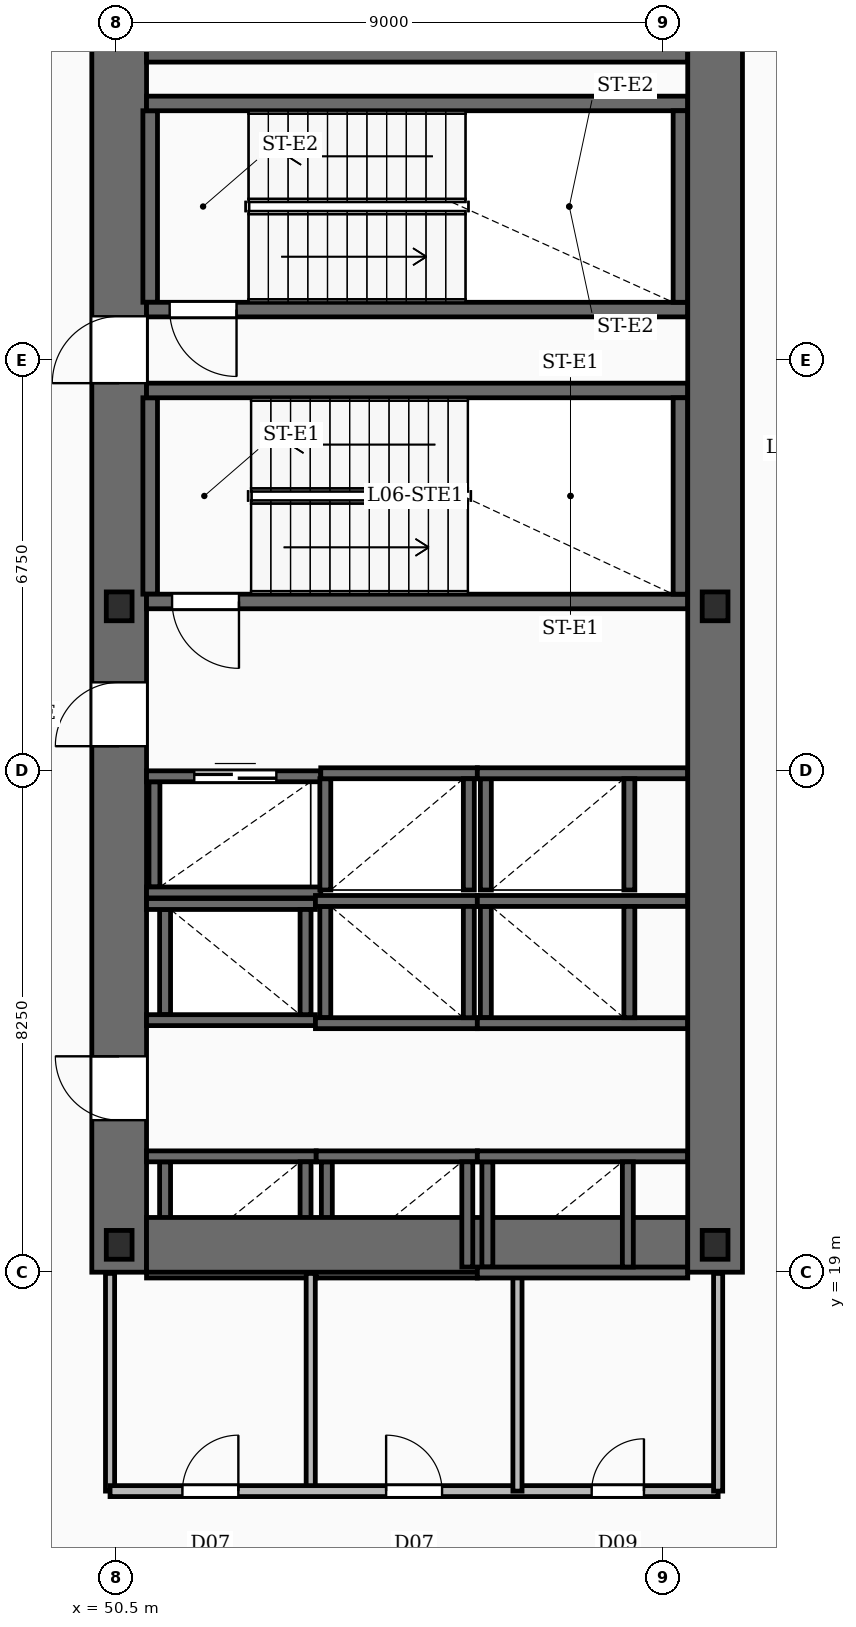
"""IFC4 building model, lengths in metres.
Left out: names, types, materials, properties, quantities, classifications, styles, units other than length and angle.
Written with IfcOpenShell. Run it as: python <this file> out.ifc"""

import sys

from ifc_helpers import new_model, si_unit, direction, frame, frame_2d, origin, origin_2d, place, context, subcontext, project, spatial, rectangle, i_section, extrude, element, fill, save


model = new_model("IFC4")
c1 = context("Model", 3, precision=1e-05, world=origin(), true_north=direction((0.0, 1.0)))
c2 = subcontext(c1, "Body", "Model", "MODEL_VIEW")
j1 = project(units=[si_unit("LENGTHUNIT", "METRE"), si_unit("PLANEANGLEUNIT", "RADIAN")], contexts=[c1])
p1 = place(None, origin())
s1 = spatial("IfcSite", under=j1, at=p1, CompositionType="ELEMENT")
p2 = place(p1, origin())
s2 = spatial("IfcBuilding", under=s1, at=p2, CompositionType="ELEMENT")
p3 = place(p2, frame((0.0, 0.0, 34.0)))
s3 = spatial("IfcBuildingStorey", under=s2, at=p3, CompositionType="ELEMENT", Elevation=34.0)
p4 = place(p3, frame((50.55, 19.0, -0.45), z_axis=(0.0, 0.0, 1.0), x_axis=(0.0, 1.0, 0.0)))
e1 = element("IfcWall", 1, at=p4, inside=s3, PredefinedType="SHEAR", context=c2, shape_type="SweptSolid", body=[
    extrude(rectangle(XDim=20.8, YDim=0.9, at=frame_2d((10.4, 0.0))), origin(), (0.0, 0.0, 1.0), 8.0),
])
p5 = place(p4, frame((2.5, 0.0, 0.45)))
e2 = element("IfcOpeningElement", 2, at=p5, cuts=e1, PredefinedType="OPENING", context=c2, shape_type="SweptSolid", body=[
    extrude(rectangle(XDim=1.05, YDim=2.15, at=frame_2d((0.525, 1.075))), frame((0.0, 0.46, 0.0), z_axis=(0.0, -1.0, 0.0), x_axis=(1.0, 0.0, 0.0)), (0.0, 0.0, 1.0), 0.92),
])
p6 = place(p4, frame((8.65, 0.0, 0.45)))
e3 = element("IfcOpeningElement", 3, at=p6, cuts=e1, PredefinedType="OPENING", context=c2, shape_type="SweptSolid", body=[
    extrude(rectangle(XDim=1.05, YDim=2.15, at=frame_2d((0.525, 1.075))), frame((0.0, 0.46, 0.0), z_axis=(0.0, -1.0, 0.0), x_axis=(1.0, 0.0, 0.0)), (0.0, 0.0, 1.0), 0.92),
])
p7 = place(p4, frame((14.62, 0.0, 0.45)))
e4 = element("IfcOpeningElement", 4, at=p7, cuts=e1, PredefinedType="OPENING", context=c2, shape_type="SweptSolid", body=[
    extrude(rectangle(XDim=1.1, YDim=2.15, at=frame_2d((0.55, 1.075))), frame((0.0, 0.46, 0.0), z_axis=(0.0, -1.0, 0.0), x_axis=(1.0, 0.0, 0.0)), (0.0, 0.0, 1.0), 0.92),
])
p8 = place(p3, frame((60.35, 19.0, -0.45), z_axis=(0.0, 0.0, 1.0), x_axis=(0.0, 1.0, 0.0)))
e5 = element("IfcWall", 5, at=p8, inside=s3, PredefinedType="SHEAR", context=c2, shape_type="SweptSolid", body=[
    extrude(rectangle(XDim=20.8, YDim=0.9, at=frame_2d((10.4, 0.0))), origin(), (0.0, 0.0, 1.0), 8.0),
])
for number, where, z_axis, x_axis in (
    (6, (51.0, 19.45, -0.45), (0.0, 0.0, 1.0), (1.0, 0.0, 0.0)),
    (7, (51.0, 39.35, -0.45), (0.0, 0.0, 1.0), (1.0, 0.0, 0.0)),
):
    element("IfcWall", number, at=place(p3, frame(where, z_axis=z_axis, x_axis=x_axis)), inside=s3, PredefinedType="SHEAR", context=c2, shape_type="SweptSolid", body=[
        extrude(rectangle(XDim=8.9, YDim=0.9, at=frame_2d((4.45, 0.0))), origin(), (0.0, 0.0, 1.0), 8.0),
    ])
for number, where, z_axis, x_axis in (
    (8, (50.55, 19.45, -0.45), (0.0, 0.0, 1.0), (1.0, 0.0, 0.0)),
    (9, (60.35, 19.45, -0.45), (0.0, 0.0, 1.0), (1.0, 0.0, 0.0)),
    (10, (50.55, 29.95, -0.45), (0.0, 0.0, 1.0), (1.0, 0.0, 0.0)),
    (11, (60.35, 29.95, -0.45), (0.0, 0.0, 1.0), (1.0, 0.0, 0.0)),
):
    element("IfcColumn", number, at=place(p3, frame(where, z_axis=z_axis, x_axis=x_axis)), inside=s3, PredefinedType="COLUMN", context=c2, shape_type="SweptSolid", body=[
        extrude(i_section(OverallWidth=0.424, OverallDepth=0.474, WebThickness=0.048, FlangeThickness=0.077, FilletRadius=0.02, at=origin_2d()), origin(), (0.0, 0.0, 1.0), 8.0),
    ])
p9 = place(p3, frame((59.9, 30.03, 0.0), z_axis=(0.0, 0.0, 1.0), x_axis=(-1.0, 0.0, 0.0)))
e12 = element("IfcWall", 12, at=p9, inside=s3, PredefinedType="SOLIDWALL", context=c2, shape_type="SweptSolid", body=[
    extrude(rectangle(XDim=8.9, YDim=0.24, at=frame_2d((4.45, 0.0))), origin(), (0.0, 0.0, 1.0), 7.55),
])
p10 = place(p9, frame((7.38, 0.0, 0.0)))
e13 = element("IfcOpeningElement", 13, at=p10, cuts=e12, PredefinedType="OPENING", context=c2, shape_type="SweptSolid", body=[
    extrude(rectangle(XDim=1.1, YDim=2.15, at=frame_2d((0.55, 1.075))), frame((0.0, 0.13, 0.0), z_axis=(0.0, -1.0, 0.0), x_axis=(1.0, 0.0, 0.0)), (0.0, 0.0, 1.0), 0.26),
])
p11 = place(p3, frame((51.0, 33.5, 0.0), z_axis=(0.0, 0.0, 1.0), x_axis=(1.0, 0.0, 0.0)))
e14 = element("IfcWall", 14, at=p11, inside=s3, PredefinedType="SOLIDWALL", context=c2, shape_type="SweptSolid", body=[
    extrude(rectangle(XDim=8.9, YDim=0.24, at=frame_2d((4.45, 0.0))), origin(), (0.0, 0.0, 1.0), 7.55),
])
for number, where, z_axis, x_axis in (
    (15, (51.06, 30.15, 0.0), (0.0, 0.0, 1.0), (0.0, 1.0, 0.0)),
    (16, (59.78, 30.15, 0.0), (0.0, 0.0, 1.0), (0.0, 1.0, 0.0)),
):
    element("IfcWall", number, at=place(p3, frame(where, z_axis=z_axis, x_axis=x_axis)), inside=s3, PredefinedType="SOLIDWALL", context=c2, shape_type="SweptSolid", body=[
        extrude(rectangle(XDim=3.23, YDim=0.24, at=frame_2d((1.615, 0.0))), origin(), (0.0, 0.0, 1.0), 7.55),
    ])
p12 = place(p3, frame((59.9, 34.83, 0.0), z_axis=(0.0, 0.0, 1.0), x_axis=(-1.0, 0.0, 0.0)))
e17 = element("IfcWall", 17, at=p12, inside=s3, PredefinedType="SOLIDWALL", context=c2, shape_type="SweptSolid", body=[
    extrude(rectangle(XDim=8.9, YDim=0.24, at=frame_2d((4.45, 0.0))), origin(), (0.0, 0.0, 1.0), 7.55),
])
p13 = place(p12, frame((7.42, 0.0, 0.0)))
e18 = element("IfcOpeningElement", 18, at=p13, cuts=e17, PredefinedType="OPENING", context=c2, shape_type="SweptSolid", body=[
    extrude(rectangle(XDim=1.1, YDim=2.15, at=frame_2d((0.55, 1.075))), frame((0.0, 0.13, 0.0), z_axis=(0.0, -1.0, 0.0), x_axis=(1.0, 0.0, 0.0)), (0.0, 0.0, 1.0), 0.26),
])
p14 = place(p3, frame((51.0, 38.22, 0.0), z_axis=(0.0, 0.0, 1.0), x_axis=(1.0, 0.0, 0.0)))
e19 = element("IfcWall", 19, at=p14, inside=s3, PredefinedType="SOLIDWALL", context=c2, shape_type="SweptSolid", body=[
    extrude(rectangle(XDim=8.9, YDim=0.24, at=frame_2d((4.45, 0.0))), origin(), (0.0, 0.0, 1.0), 7.55),
])
for number, where, z_axis, x_axis in (
    (20, (51.06, 34.95, 0.0), (0.0, 0.0, 1.0), (0.0, 1.0, 0.0)),
    (21, (59.78, 34.95, 0.0), (0.0, 0.0, 1.0), (0.0, 1.0, 0.0)),
):
    element("IfcWall", number, at=place(p3, frame(where, z_axis=z_axis, x_axis=x_axis)), inside=s3, PredefinedType="SOLIDWALL", context=c2, shape_type="SweptSolid", body=[
        extrude(rectangle(XDim=3.15, YDim=0.24, at=frame_2d((1.575, 0.0))), origin(), (0.0, 0.0, 1.0), 7.55),
    ])
for number, where, z_axis, x_axis in (
    (22, (51.0, 20.905, 0.0), (0.0, 0.0, 1.0), (1.0, 0.0, 0.0)),
    (23, (51.0, 18.995, 0.0), (0.0, 0.0, 1.0), (1.0, 0.0, 0.0)),
):
    element("IfcWall", number, at=place(p3, frame(where, z_axis=z_axis, x_axis=x_axis)), inside=s3, PredefinedType="SOLIDWALL", context=c2, shape_type="SweptSolid", body=[
        extrude(rectangle(XDim=2.79, YDim=0.18, at=frame_2d((1.395, 0.0))), origin(), (0.0, 0.0, 1.0), 7.55),
    ])
for number, where, z_axis, x_axis in (
    (24, (51.305, 19.085, 0.0), (0.0, 0.0, 1.0), (0.0, 1.0, 0.0)),
    (25, (53.615, 19.085, 0.0), (0.0, 0.0, 1.0), (0.0, 1.0, 0.0)),
):
    element("IfcWall", number, at=place(p3, frame(where, z_axis=z_axis, x_axis=x_axis)), inside=s3, PredefinedType="SOLIDWALL", context=c2, shape_type="SweptSolid", body=[
        extrude(rectangle(XDim=1.73, YDim=0.18, at=frame_2d((0.865, 0.0))), origin(), (0.0, 0.0, 1.0), 7.55),
    ])
for number, where, z_axis, x_axis in (
    (26, (53.79, 20.905, 0.0), (0.0, 0.0, 1.0), (1.0, 0.0, 0.0)),
    (27, (53.79, 18.995, 0.0), (0.0, 0.0, 1.0), (1.0, 0.0, 0.0)),
):
    element("IfcWall", number, at=place(p3, frame(where, z_axis=z_axis, x_axis=x_axis)), inside=s3, PredefinedType="SOLIDWALL", context=c2, shape_type="SweptSolid", body=[
        extrude(rectangle(XDim=2.65, YDim=0.18, at=frame_2d((1.325, 0.0))), origin(), (0.0, 0.0, 1.0), 7.55),
    ])
for number, where, z_axis, x_axis in (
    (28, (53.965, 19.085, 0.0), (0.0, 0.0, 1.0), (0.0, 1.0, 0.0)),
    (29, (56.275, 19.085, 0.0), (0.0, 0.0, 1.0), (0.0, 1.0, 0.0)),
):
    element("IfcWall", number, at=place(p3, frame(where, z_axis=z_axis, x_axis=x_axis)), inside=s3, PredefinedType="SOLIDWALL", context=c2, shape_type="SweptSolid", body=[
        extrude(rectangle(XDim=1.73, YDim=0.18, at=frame_2d((0.865, 0.0))), origin(), (0.0, 0.0, 1.0), 7.55),
    ])
for number, where, z_axis, x_axis in (
    (30, (56.44, 20.905, 0.0), (0.0, 0.0, 1.0), (1.0, 0.0, 0.0)),
    (31, (56.44, 18.995, 0.0), (0.0, 0.0, 1.0), (1.0, 0.0, 0.0)),
):
    element("IfcWall", number, at=place(p3, frame(where, z_axis=z_axis, x_axis=x_axis)), inside=s3, PredefinedType="SOLIDWALL", context=c2, shape_type="SweptSolid", body=[
        extrude(rectangle(XDim=3.46, YDim=0.18, at=frame_2d((1.73, 0.0))), origin(), (0.0, 0.0, 1.0), 7.55),
    ])
for number, where, z_axis, x_axis in (
    (32, (56.605, 19.085, 0.0), (0.0, 0.0, 1.0), (0.0, 1.0, 0.0)),
    (33, (58.915, 19.085, 0.0), (0.0, 0.0, 1.0), (0.0, 1.0, 0.0)),
):
    element("IfcWall", number, at=place(p3, frame(where, z_axis=z_axis, x_axis=x_axis)), inside=s3, PredefinedType="SOLIDWALL", context=c2, shape_type="SweptSolid", body=[
        extrude(rectangle(XDim=1.73, YDim=0.18, at=frame_2d((0.865, 0.0))), origin(), (0.0, 0.0, 1.0), 7.55),
    ])
for number, where, z_axis, x_axis in (
    (34, (51.0, 25.055, 0.0), (0.0, 0.0, 1.0), (1.0, 0.0, 0.0)),
    (35, (51.0, 23.145, 0.0), (0.0, 0.0, 1.0), (1.0, 0.0, 0.0)),
):
    element("IfcWall", number, at=place(p3, frame(where, z_axis=z_axis, x_axis=x_axis)), inside=s3, PredefinedType="SOLIDWALL", context=c2, shape_type="SweptSolid", body=[
        extrude(rectangle(XDim=2.778, YDim=0.18, at=frame_2d((1.389, 0.0))), origin(), (0.0, 0.0, 1.0), 7.55),
    ])
for number, where, z_axis, x_axis in (
    (36, (51.305, 23.235, 0.0), (0.0, 0.0, 1.0), (0.0, 1.0, 0.0)),
    (37, (53.615, 23.235, 0.0), (0.0, 0.0, 1.0), (0.0, 1.0, 0.0)),
):
    element("IfcWall", number, at=place(p3, frame(where, z_axis=z_axis, x_axis=x_axis)), inside=s3, PredefinedType="SOLIDWALL", context=c2, shape_type="SweptSolid", body=[
        extrude(rectangle(XDim=1.73, YDim=0.18, at=frame_2d((0.865, 0.0))), origin(), (0.0, 0.0, 1.0), 7.55),
    ])
for number, where, z_axis, x_axis in (
    (38, (53.778, 25.105, 0.0), (0.0, 0.0, 1.0), (1.0, 0.0, 0.0)),
    (39, (53.778, 23.095, 0.0), (0.0, 0.0, 1.0), (1.0, 0.0, 0.0)),
):
    element("IfcWall", number, at=place(p3, frame(where, z_axis=z_axis, x_axis=x_axis)), inside=s3, PredefinedType="SOLIDWALL", context=c2, shape_type="SweptSolid", body=[
        extrude(rectangle(XDim=2.662, YDim=0.18, at=frame_2d((1.331, 0.0))), origin(), (0.0, 0.0, 1.0), 7.55),
    ])
for number, where, z_axis, x_axis in (
    (40, (53.94, 23.185, 0.0), (0.0, 0.0, 1.0), (0.0, 1.0, 0.0)),
    (41, (56.3, 23.185, 0.0), (0.0, 0.0, 1.0), (0.0, 1.0, 0.0)),
):
    element("IfcWall", number, at=place(p3, frame(where, z_axis=z_axis, x_axis=x_axis)), inside=s3, PredefinedType="SOLIDWALL", context=c2, shape_type="SweptSolid", body=[
        extrude(rectangle(XDim=1.83, YDim=0.18, at=frame_2d((0.915, 0.0))), origin(), (0.0, 0.0, 1.0), 7.55),
    ])
for number, where, z_axis, x_axis in (
    (42, (56.44, 25.105, 0.0), (0.0, 0.0, 1.0), (1.0, 0.0, 0.0)),
    (43, (56.44, 23.095, 0.0), (0.0, 0.0, 1.0), (1.0, 0.0, 0.0)),
):
    element("IfcWall", number, at=place(p3, frame(where, z_axis=z_axis, x_axis=x_axis)), inside=s3, PredefinedType="SOLIDWALL", context=c2, shape_type="SweptSolid", body=[
        extrude(rectangle(XDim=3.46, YDim=0.18, at=frame_2d((1.73, 0.0))), origin(), (0.0, 0.0, 1.0), 7.55),
    ])
for number, where, z_axis, x_axis in (
    (44, (56.58, 23.185, 0.0), (0.0, 0.0, 1.0), (0.0, 1.0, 0.0)),
    (45, (58.94, 23.185, 0.0), (0.0, 0.0, 1.0), (0.0, 1.0, 0.0)),
):
    element("IfcWall", number, at=place(p3, frame(where, z_axis=z_axis, x_axis=x_axis)), inside=s3, PredefinedType="SOLIDWALL", context=c2, shape_type="SweptSolid", body=[
        extrude(rectangle(XDim=1.83, YDim=0.18, at=frame_2d((0.915, 0.0))), origin(), (0.0, 0.0, 1.0), 7.55),
    ])
p15 = place(p3, frame((53.865, 27.205, 0.0), z_axis=(0.0, 0.0, 1.0), x_axis=(1.0, 0.0, 0.0)))
e46 = element("IfcWall", 46, at=p15, inside=s3, PredefinedType="SOLIDWALL", context=c2, shape_type="SweptSolid", body=[
    extrude(rectangle(XDim=2.575, YDim=0.18, at=frame_2d((1.288, 0.0))), origin(), (0.0, 0.0, 1.0), 7.55),
])
for number, where, z_axis, x_axis in (
    (47, (53.94, 25.285, 0.0), (0.0, 0.0, 1.0), (0.0, 1.0, 0.0)),
    (48, (56.3, 25.285, 0.0), (0.0, 0.0, 1.0), (0.0, 1.0, 0.0)),
):
    element("IfcWall", number, at=place(p3, frame(where, z_axis=z_axis, x_axis=x_axis)), inside=s3, PredefinedType="SOLIDWALL", context=c2, shape_type="SweptSolid", body=[
        extrude(rectangle(XDim=1.83, YDim=0.18, at=frame_2d((0.915, 0.0))), origin(), (0.0, 0.0, 1.0), 7.55),
    ])
p16 = place(p3, frame((56.44, 27.205, 0.0), z_axis=(0.0, 0.0, 1.0), x_axis=(1.0, 0.0, 0.0)))
e49 = element("IfcWall", 49, at=p16, inside=s3, PredefinedType="SOLIDWALL", context=c2, shape_type="SweptSolid", body=[
    extrude(rectangle(XDim=3.46, YDim=0.18, at=frame_2d((1.73, 0.0))), origin(), (0.0, 0.0, 1.0), 7.55),
])
for number, where, z_axis, x_axis in (
    (50, (56.58, 25.285, 0.0), (0.0, 0.0, 1.0), (0.0, 1.0, 0.0)),
    (51, (58.94, 25.285, 0.0), (0.0, 0.0, 1.0), (0.0, 1.0, 0.0)),
):
    element("IfcWall", number, at=place(p3, frame(where, z_axis=z_axis, x_axis=x_axis)), inside=s3, PredefinedType="SOLIDWALL", context=c2, shape_type="SweptSolid", body=[
        extrude(rectangle(XDim=1.83, YDim=0.18, at=frame_2d((0.915, 0.0))), origin(), (0.0, 0.0, 1.0), 7.55),
    ])
p17 = place(p3, frame((51.0, 27.155, 0.0), z_axis=(0.0, 0.0, 1.0), x_axis=(1.0, 0.0, 0.0)))
e52 = element("IfcWall", 52, at=p17, inside=s3, PredefinedType="SOLIDWALL", context=c2, shape_type="SweptSolid", body=[
    extrude(rectangle(XDim=2.865, YDim=0.18, at=frame_2d((1.433, 0.0))), origin(), (0.0, 0.0, 1.0), 7.55),
])
p18 = place(p17, frame((0.785, 0.0, 0.0)))
e53 = element("IfcOpeningElement", 53, at=p18, cuts=e52, PredefinedType="OPENING", context=c2, shape_type="SweptSolid", body=[
    extrude(rectangle(XDim=1.35, YDim=2.3, at=frame_2d((0.675, 1.15))), frame((0.0, 0.1, 0.0), z_axis=(0.0, -1.0, 0.0), x_axis=(1.0, 0.0, 0.0)), (0.0, 0.0, 1.0), 0.2),
])
p19 = place(p3, frame((51.0, 25.245, 0.0), z_axis=(0.0, 0.0, 1.0), x_axis=(1.0, 0.0, 0.0)))
e54 = element("IfcWall", 54, at=p19, inside=s3, PredefinedType="SOLIDWALL", context=c2, shape_type="SweptSolid", body=[
    extrude(rectangle(XDim=2.865, YDim=0.18, at=frame_2d((1.433, 0.0))), origin(), (0.0, 0.0, 1.0), 7.55),
])
p20 = place(p3, frame((51.13, 25.335, 0.0), z_axis=(0.0, 0.0, 1.0), x_axis=(0.0, 1.0, 0.0)))
e55 = element("IfcWall", 55, at=p20, inside=s3, PredefinedType="SOLIDWALL", context=c2, shape_type="SweptSolid", body=[
    extrude(rectangle(XDim=1.73, YDim=0.18, at=frame_2d((0.865, 0.0))), origin(), (0.0, 0.0, 1.0), 7.55),
])
for number, where, z_axis, x_axis in (
    (56, (53.7, 15.4, 0.0), (0.0, 0.0, 1.0), (0.0, 1.0, 0.0)),
    (57, (57.1, 15.4, 0.0), (0.0, 0.0, 1.0), (0.0, 1.0, 0.0)),
):
    element("IfcWall", number, at=place(p3, frame(where, z_axis=z_axis, x_axis=x_axis)), inside=s3, PredefinedType="PARTITIONING", context=c2, shape_type="SweptSolid", body=[
        extrude(rectangle(XDim=3.58, YDim=0.15, at=frame_2d((1.79, 0.0))), origin(), (0.0, 0.0, 1.0), 6.61),
    ])
p21 = place(p3, frame((50.4, 15.4, 0.0), z_axis=(0.0, 0.0, 1.0), x_axis=(1.0, 0.0, 0.0)))
e58 = element("IfcWall", 58, at=p21, inside=s3, PredefinedType="SOLIDWALL", context=c2, shape_type="SweptSolid", body=[
    extrude(rectangle(XDim=10.0, YDim=0.18, at=frame_2d((5.0, 0.0))), origin(), (0.0, 0.0, 1.0), 6.61),
])
p22 = place(p21, frame((1.19, 0.0, 0.0)))
e59 = element("IfcOpeningElement", 59, at=p22, cuts=e58, PredefinedType="OPENING", context=c2, shape_type="SweptSolid", body=[
    extrude(rectangle(XDim=0.92, YDim=2.1, at=frame_2d((0.46, 1.05))), frame((0.0, 0.1, 0.0), z_axis=(0.0, -1.0, 0.0), x_axis=(1.0, 0.0, 0.0)), (0.0, 0.0, 1.0), 0.2),
])
p23 = place(p21, frame((4.54, 0.0, 0.0)))
e60 = element("IfcOpeningElement", 60, at=p23, cuts=e58, PredefinedType="OPENING", context=c2, shape_type="SweptSolid", body=[
    extrude(rectangle(XDim=0.92, YDim=2.1, at=frame_2d((0.46, 1.05))), frame((0.0, 0.1, 0.0), z_axis=(0.0, -1.0, 0.0), x_axis=(1.0, 0.0, 0.0)), (0.0, 0.0, 1.0), 0.2),
])
p24 = place(p21, frame((7.92, 0.0, 0.0)))
e61 = element("IfcOpeningElement", 61, at=p24, cuts=e58, PredefinedType="OPENING", context=c2, shape_type="SweptSolid", body=[
    extrude(rectangle(XDim=0.86, YDim=2.05, at=frame_2d((0.43, 1.025))), frame((0.0, 0.1, 0.0), z_axis=(0.0, -1.0, 0.0), x_axis=(1.0, 0.0, 0.0)), (0.0, 0.0, 1.0), 0.2),
])
p25 = place(p3, frame((50.4, 15.4, 0.0), z_axis=(0.0, 0.0, 1.0), x_axis=(0.0, 1.0, 0.0)))
e62 = element("IfcWall", 62, at=p25, inside=s3, PredefinedType="PARTITIONING", context=c2, shape_type="SweptSolid", body=[
    extrude(rectangle(XDim=3.58, YDim=0.15, at=frame_2d((1.79, 0.0))), origin(), (0.0, 0.0, 1.0), 5.6),
])
p26 = place(p3, frame((60.4, 15.4, 0.0), z_axis=(0.0, 0.0, 1.0), x_axis=(0.0, 1.0, 0.0)))
e63 = element("IfcWall", 63, at=p26, inside=s3, PredefinedType="PARTITIONING", context=c2, shape_type="SweptSolid", body=[
    extrude(rectangle(XDim=3.58, YDim=0.15, at=frame_2d((1.79, 0.0))), origin(), (0.0, 0.0, 1.0), 6.61),
])
p27 = place(p5, origin())
e64 = element("IfcDoor", 64, at=p27, inside=s3, OperationType="SINGLE_SWING_RIGHT", PredefinedType="DOOR", context=c2, shape_type="SweptSolid", body=[
    extrude(rectangle(XDim=1.05, YDim=2.15, at=frame_2d((0.525, 1.075))), frame((0.0, 0.025, 0.0), z_axis=(0.0, -1.0, 0.0), x_axis=(1.0, 0.0, 0.0)), (0.0, 0.0, 1.0), 0.05),
])
fill(e2, e64)
p28 = place(p6, origin())
e65 = element("IfcDoor", 65, at=p28, inside=s3, OperationType="SINGLE_SWING_LEFT", PredefinedType="DOOR", context=c2, shape_type="SweptSolid", body=[
    extrude(rectangle(XDim=1.05, YDim=2.15, at=frame_2d((0.525, 1.075))), frame((0.0, 0.025, 0.0), z_axis=(0.0, -1.0, 0.0), x_axis=(1.0, 0.0, 0.0)), (0.0, 0.0, 1.0), 0.05),
])
fill(e3, e65)
p29 = place(p7, origin())
e66 = element("IfcDoor", 66, at=p29, inside=s3, OperationType="SINGLE_SWING_LEFT", PredefinedType="DOOR", context=c2, shape_type="SweptSolid", body=[
    extrude(rectangle(XDim=1.1, YDim=2.15, at=frame_2d((0.55, 1.075))), frame((0.0, 0.025, 0.0), z_axis=(0.0, -1.0, 0.0), x_axis=(1.0, 0.0, 0.0)), (0.0, 0.0, 1.0), 0.05),
])
fill(e4, e66)
p30 = place(p10, origin())
e67 = element("IfcDoor", 67, at=p30, inside=s3, OperationType="SINGLE_SWING_LEFT", PredefinedType="DOOR", context=c2, shape_type="SweptSolid", body=[
    extrude(rectangle(XDim=1.1, YDim=2.15, at=frame_2d((0.55, 1.075))), frame((0.0, 0.025, 0.0), z_axis=(0.0, -1.0, 0.0), x_axis=(1.0, 0.0, 0.0)), (0.0, 0.0, 1.0), 0.05),
])
fill(e13, e67)
p31 = place(p13, origin())
e68 = element("IfcDoor", 68, at=p31, inside=s3, OperationType="SINGLE_SWING_LEFT", PredefinedType="DOOR", context=c2, shape_type="SweptSolid", body=[
    extrude(rectangle(XDim=1.1, YDim=2.15, at=frame_2d((0.55, 1.075))), frame((0.0, 0.025, 0.0), z_axis=(0.0, -1.0, 0.0), x_axis=(1.0, 0.0, 0.0)), (0.0, 0.0, 1.0), 0.05),
])
fill(e18, e68)
p32 = place(p18, origin())
e69 = element("IfcDoor", 69, at=p32, inside=s3, OperationType="DOUBLE_DOOR_SLIDING", PredefinedType="DOOR", context=c2, shape_type="SweptSolid", body=[
    extrude(rectangle(XDim=1.35, YDim=2.3, at=frame_2d((0.675, 1.15))), frame((0.0, 0.025, 0.0), z_axis=(0.0, -1.0, 0.0), x_axis=(1.0, 0.0, 0.0)), (0.0, 0.0, 1.0), 0.05),
])
fill(e53, e69)
p33 = place(p22, origin())
e70 = element("IfcDoor", 70, at=p33, inside=s3, OperationType="SINGLE_SWING_RIGHT", PredefinedType="DOOR", context=c2, shape_type="SweptSolid", body=[
    extrude(rectangle(XDim=0.92, YDim=2.1, at=frame_2d((0.46, 1.05))), frame((0.0, 0.025, 0.0), z_axis=(0.0, -1.0, 0.0), x_axis=(1.0, 0.0, 0.0)), (0.0, 0.0, 1.0), 0.05),
])
fill(e59, e70)
p34 = place(p23, origin())
e71 = element("IfcDoor", 71, at=p34, inside=s3, OperationType="SINGLE_SWING_LEFT", PredefinedType="DOOR", context=c2, shape_type="SweptSolid", body=[
    extrude(rectangle(XDim=0.92, YDim=2.1, at=frame_2d((0.46, 1.05))), frame((0.0, 0.025, 0.0), z_axis=(0.0, -1.0, 0.0), x_axis=(1.0, 0.0, 0.0)), (0.0, 0.0, 1.0), 0.05),
])
fill(e60, e71)
p35 = place(p24, origin())
e72 = element("IfcDoor", 72, at=p35, inside=s3, OperationType="SINGLE_SWING_RIGHT", PredefinedType="DOOR", context=c2, shape_type="SweptSolid", body=[
    extrude(rectangle(XDim=0.86, YDim=2.05, at=frame_2d((0.43, 1.025))), frame((0.0, 0.025, 0.0), z_axis=(0.0, -1.0, 0.0), x_axis=(1.0, 0.0, 0.0)), (0.0, 0.0, 1.0), 0.05),
])
fill(e61, e72)
save(model, sys.argv[1])
